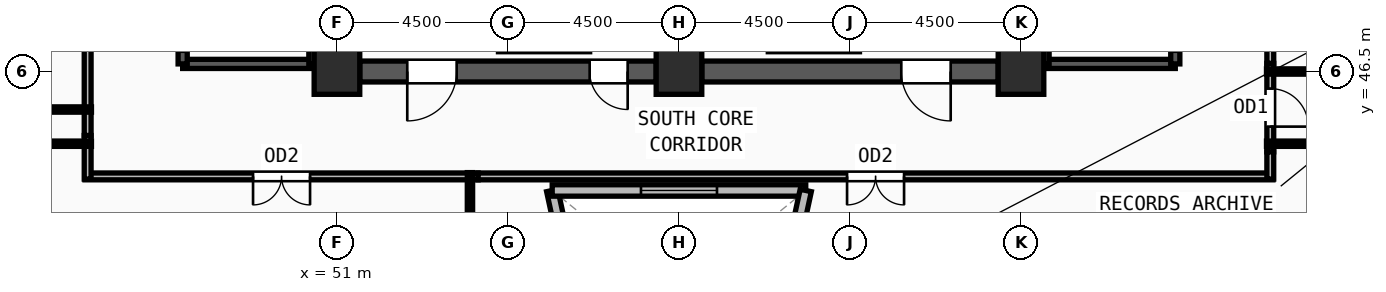
"""IFC4 building model, lengths in metres.
Left out: names, types, materials, properties, quantities, classifications, styles, units other than length and angle.
Written with IfcOpenShell. Run it as: python <this file> out.ifc"""

import sys

from ifc_helpers import new_model, si_unit, direction, frame, frame_2d, origin, origin_2d, place, context, subcontext, project, spatial, rectangle, extrude, source, transform, mapped, element, fill, save


model = new_model("IFC4")
c1 = context("Model", 3, precision=1e-05, world=origin(), true_north=direction((0.0, 1.0)))
c2 = subcontext(c1, "Body", "Model", "MODEL_VIEW")
j1 = project(units=[si_unit("LENGTHUNIT", "METRE"), si_unit("PLANEANGLEUNIT", "RADIAN")], contexts=[c1])
p1 = place(None, origin())
s1 = spatial("IfcSite", under=j1, at=p1, CompositionType="ELEMENT")
p2 = place(p1, origin())
s2 = spatial("IfcBuilding", under=s1, at=p2, CompositionType="ELEMENT")
p3 = place(p2, frame((0.0, 0.0, 339.75)))
s3 = spatial("IfcBuildingStorey", under=s2, at=p3, CompositionType="ELEMENT", Elevation=339.75)
m1 = source(origin(), c2, "Body", "SweptSolid", [
    extrude(rectangle(XDim=1.2, YDim=1.2, at=origin_2d()), origin(), (0.0, 0.0, 1.0), 3.75),
])
for number, where, z_axis, x_axis in (
    (1, (51.0, 46.5, 0.0), (0.0, 0.0, 1.0), (1.0, 0.0, 0.0)),
    (2, (60.0, 46.5, 0.0), (0.0, 0.0, 1.0), (1.0, 0.0, 0.0)),
    (3, (69.0, 46.5, 0.0), (0.0, 0.0, 1.0), (1.0, 0.0, 0.0)),
):
    element("IfcColumn", number, at=place(p3, frame(where, z_axis=z_axis, x_axis=x_axis)), inside=s3, PredefinedType="COLUMN", context=c2, shape_type="MappedRepresentation", body=[
        mapped(m1, transform((0.0, 0.0, 0.0), x_axis=(1.0, 0.0, 0.0), y_axis=(0.0, 1.0, 0.0), z_axis=(0.0, 0.0, 1.0), scale=1.0)),
    ])
p4 = place(p3, frame((40.771, 44.855, 0.0), z_axis=(0.0, 0.0, 1.0), x_axis=(0.558627041585, -0.82941897037, 0.0)))
e4 = element("IfcWall", 4, at=p4, inside=s3, PredefinedType="SOLIDWALL", context=c2, shape_type="SweptSolid", body=[
    extrude(rectangle(XDim=25.455, YDim=0.38, at=frame_2d((12.728, 0.0))), origin(), (0.0, 0.0, 1.0), 3.57),
])
m2 = source(origin(), c2, "Body", "SweptSolid", [
    extrude(rectangle(XDim=1.35, YDim=1.85, at=frame_2d((0.675, 0.925))), frame((0.0, 0.2, 0.0), z_axis=(0.0, -1.0, 0.0), x_axis=(1.0, 0.0, 0.0)), (0.0, 0.0, 1.0), 0.4),
])
p5 = place(p4, frame((5.689, 0.0, 0.55)))
e5 = element("IfcOpeningElement", 5, at=p5, cuts=e4, PredefinedType="OPENING", context=c2, shape_type="MappedRepresentation", body=[
    mapped(m2, transform((0.0, 0.0, 0.0), x_axis=(1.0, 0.0, 0.0), y_axis=(0.0, 1.0, 0.0), z_axis=(0.0, 0.0, 1.0), scale=1.0)),
])
p6 = place(p4, frame((12.053, 0.0, 0.55)))
e6 = element("IfcOpeningElement", 6, at=p6, cuts=e4, PredefinedType="OPENING", context=c2, shape_type="MappedRepresentation", body=[
    mapped(m2, transform((0.0, 0.0, 0.0), x_axis=(1.0, 0.0, 0.0), y_axis=(0.0, 1.0, 0.0), z_axis=(0.0, 0.0, 1.0), scale=1.0)),
])
p7 = place(p4, frame((18.416, 0.0, 0.55)))
e7 = element("IfcOpeningElement", 7, at=p7, cuts=e4, PredefinedType="OPENING", context=c2, shape_type="MappedRepresentation", body=[
    mapped(m2, transform((0.0, 0.0, 0.0), x_axis=(1.0, 0.0, 0.0), y_axis=(0.0, 1.0, 0.0), z_axis=(0.0, 0.0, 1.0), scale=1.0)),
])
p8 = place(p3, frame((68.4, 46.5, 0.0), z_axis=(0.0, 0.0, 1.0), x_axis=(-1.0, 0.0, 0.0)))
e8 = element("IfcWall", 8, at=p8, inside=s3, PredefinedType="SHEAR", context=c2, shape_type="SweptSolid", body=[
    extrude(rectangle(XDim=7.8, YDim=0.55, at=frame_2d((3.9, 0.0))), origin(), (0.0, 0.0, 1.0), 3.57),
])
m3 = source(origin(), c2, "Body", "SweptSolid", [
    extrude(rectangle(XDim=1.3, YDim=2.2, at=frame_2d((0.65, 1.1))), frame((0.0, 0.285, 0.0), z_axis=(0.0, -1.0, 0.0), x_axis=(1.0, 0.0, 0.0)), (0.0, 0.0, 1.0), 0.57),
])
p9 = place(p8, frame((1.25, 0.0, 0.0)))
e9 = element("IfcOpeningElement", 9, at=p9, cuts=e8, PredefinedType="OPENING", context=c2, shape_type="MappedRepresentation", body=[
    mapped(m3, transform((0.0, 0.0, 0.0), x_axis=(1.0, 0.0, 0.0), y_axis=(0.0, 1.0, 0.0), z_axis=(0.0, 0.0, 1.0), scale=1.0)),
])
p10 = place(p3, frame((59.4, 46.5, 0.0), z_axis=(0.0, 0.0, 1.0), x_axis=(-1.0, 0.0, 0.0)))
e10 = element("IfcWall", 10, at=p10, inside=s3, PredefinedType="SHEAR", context=c2, shape_type="SweptSolid", body=[
    extrude(rectangle(XDim=7.8, YDim=0.55, at=frame_2d((3.9, 0.0))), origin(), (0.0, 0.0, 1.0), 3.57),
])
p11 = place(p10, frame((5.25, 0.0, 0.0)))
e11 = element("IfcOpeningElement", 11, at=p11, cuts=e10, PredefinedType="OPENING", context=c2, shape_type="MappedRepresentation", body=[
    mapped(m3, transform((0.0, 0.0, 0.0), x_axis=(1.0, 0.0, 0.0), y_axis=(0.0, 1.0, 0.0), z_axis=(0.0, 0.0, 1.0), scale=1.0)),
])
m4 = source(origin(), c2, "Body", "SweptSolid", [
    extrude(rectangle(XDim=1.0, YDim=2.2, at=frame_2d((0.5, 1.1))), frame((0.0, 0.285, 0.0), z_axis=(0.0, -1.0, 0.0), x_axis=(1.0, 0.0, 0.0)), (0.0, 0.0, 1.0), 0.57),
])
p12 = place(p10, frame((0.75, 0.0, 0.0)))
e12 = element("IfcOpeningElement", 12, at=p12, cuts=e10, PredefinedType="OPENING", context=c2, shape_type="MappedRepresentation", body=[
    mapped(m4, transform((0.0, 0.0, 0.0), x_axis=(1.0, 0.0, 0.0), y_axis=(0.0, 1.0, 0.0), z_axis=(0.0, 0.0, 1.0), scale=1.0)),
])
p13 = place(p3, frame((46.94, 46.7, 0.0), z_axis=(0.0, 0.0, 1.0), x_axis=(1.0, 0.0, 0.0)))
e13 = element("IfcWall", 13, at=p13, inside=s3, PredefinedType="SOLIDWALL", context=c2, shape_type="SweptSolid", body=[
    extrude(rectangle(XDim=3.44, YDim=0.24, at=frame_2d((1.72, 0.0))), origin(), (0.0, 0.0, 1.0), 3.57),
])
p14 = place(p3, frame((50.38, 46.7, 0.0), z_axis=(0.0, 0.0, 1.0), x_axis=(0.0, 1.0, 0.0)))
e14 = element("IfcWall", 14, at=p14, inside=s3, PredefinedType="SOLIDWALL", context=c2, shape_type="SweptSolid", body=[
    extrude(rectangle(XDim=7.82, YDim=0.24, at=frame_2d((3.91, 0.0))), origin(), (0.0, 0.0, 1.0), 3.57),
])
p15 = place(p3, frame((46.94, 54.52, 0.0), z_axis=(0.0, 0.0, 1.0), x_axis=(0.0, -1.0, 0.0)))
e15 = element("IfcWall", 15, at=p15, inside=s3, PredefinedType="SOLIDWALL", context=c2, shape_type="SweptSolid", body=[
    extrude(rectangle(XDim=7.82, YDim=0.24, at=frame_2d((3.91, 0.0))), origin(), (0.0, 0.0, 1.0), 3.57),
])
m5 = source(origin(), c2, "Body", "SweptSolid", [
    extrude(rectangle(XDim=1.2, YDim=2.2, at=frame_2d((0.6, 1.1))), frame((0.0, 0.13, 0.0), z_axis=(0.0, -1.0, 0.0), x_axis=(1.0, 0.0, 0.0)), (0.0, 0.0, 1.0), 0.26),
])
p16 = place(p15, frame((6.3, 0.0, 0.0)))
e16 = element("IfcOpeningElement", 16, at=p16, cuts=e15, PredefinedType="OPENING", context=c2, shape_type="MappedRepresentation", body=[
    mapped(m5, transform((0.0, 0.0, 0.0), x_axis=(1.0, 0.0, 0.0), y_axis=(0.0, 1.0, 0.0), z_axis=(0.0, 0.0, 1.0), scale=1.0)),
])
p17 = place(p3, frame((69.62, 46.7, 0.0), z_axis=(0.0, 0.0, 1.0), x_axis=(1.0, 0.0, 0.0)))
e17 = element("IfcWall", 17, at=p17, inside=s3, PredefinedType="SOLIDWALL", context=c2, shape_type="SweptSolid", body=[
    extrude(rectangle(XDim=3.44, YDim=0.24, at=frame_2d((1.72, 0.0))), origin(), (0.0, 0.0, 1.0), 3.57),
])
p18 = place(p3, frame((73.06, 46.7, 0.0), z_axis=(0.0, 0.0, 1.0), x_axis=(0.0, 1.0, 0.0)))
e18 = element("IfcWall", 18, at=p18, inside=s3, PredefinedType="SOLIDWALL", context=c2, shape_type="SweptSolid", body=[
    extrude(rectangle(XDim=7.82, YDim=0.24, at=frame_2d((3.91, 0.0))), origin(), (0.0, 0.0, 1.0), 3.57),
])
p19 = place(p18, frame((0.32, 0.0, 0.0)))
e19 = element("IfcOpeningElement", 19, at=p19, cuts=e18, PredefinedType="OPENING", context=c2, shape_type="MappedRepresentation", body=[
    mapped(m5, transform((0.0, 0.0, 0.0), x_axis=(1.0, 0.0, 0.0), y_axis=(0.0, 1.0, 0.0), z_axis=(0.0, 0.0, 1.0), scale=1.0)),
])
p20 = place(p3, frame((69.62, 54.52, 0.0), z_axis=(0.0, 0.0, 1.0), x_axis=(0.0, -1.0, 0.0)))
e20 = element("IfcWall", 20, at=p20, inside=s3, PredefinedType="SOLIDWALL", context=c2, shape_type="SweptSolid", body=[
    extrude(rectangle(XDim=7.82, YDim=0.24, at=frame_2d((3.91, 0.0))), origin(), (0.0, 0.0, 1.0), 3.57),
])
p21 = place(p3, frame((57.832, 37.971, 0.0), z_axis=(0.0, 0.0, 1.0), x_axis=(-0.211433211418, 0.977392447848, 0.0)))
e21 = element("IfcWall", 21, at=p21, inside=s3, PredefinedType="SOLIDWALL", context=c2, shape_type="SweptSolid", body=[
    extrude(rectangle(XDim=5.524, YDim=0.3, at=frame_2d((2.762, 0.0))), origin(), (0.0, 0.0, 1.0), 3.57),
])
m6 = source(origin(), c2, "Body", "SweptSolid", [
    extrude(rectangle(XDim=2.0, YDim=1.9, at=frame_2d((1.0, 0.95))), frame((0.0, 0.16, 0.0), z_axis=(0.0, -1.0, 0.0), x_axis=(1.0, 0.0, 0.0)), (0.0, 0.0, 1.0), 0.32),
])
p22 = place(p21, frame((1.762, 0.0, 0.55)))
e22 = element("IfcOpeningElement", 22, at=p22, cuts=e21, PredefinedType="OPENING", context=c2, shape_type="MappedRepresentation", body=[
    mapped(m6, transform((0.0, 0.0, 0.0), x_axis=(1.0, 0.0, 0.0), y_axis=(0.0, 1.0, 0.0), z_axis=(0.0, 0.0, 1.0), scale=1.0)),
])
p23 = place(p3, frame((56.664, 43.37, 0.0), z_axis=(0.0, 0.0, 1.0), x_axis=(1.0, 0.0, 0.0)))
e23 = element("IfcWall", 23, at=p23, inside=s3, PredefinedType="SOLIDWALL", context=c2, shape_type="SweptSolid", body=[
    extrude(rectangle(XDim=6.672, YDim=0.3, at=frame_2d((3.336, 0.0))), origin(), (0.0, 0.0, 1.0), 3.57),
])
p24 = place(p23, frame((2.336, 0.0, 0.55)))
e24 = element("IfcOpeningElement", 24, at=p24, cuts=e23, PredefinedType="OPENING", context=c2, shape_type="MappedRepresentation", body=[
    mapped(m6, transform((0.0, 0.0, 0.0), x_axis=(1.0, 0.0, 0.0), y_axis=(0.0, 1.0, 0.0), z_axis=(0.0, 0.0, 1.0), scale=1.0)),
])
p25 = place(p3, frame((63.336, 43.37, 0.0), z_axis=(0.0, 0.0, 1.0), x_axis=(-0.211433211418, -0.977392447848, 0.0)))
e25 = element("IfcWall", 25, at=p25, inside=s3, PredefinedType="SOLIDWALL", context=c2, shape_type="SweptSolid", body=[
    extrude(rectangle(XDim=5.524, YDim=0.3, at=frame_2d((2.762, 0.0))), origin(), (0.0, 0.0, 1.0), 3.57),
])
p26 = place(p25, frame((1.762, 0.0, 0.55)))
e26 = element("IfcOpeningElement", 26, at=p26, cuts=e25, PredefinedType="OPENING", context=c2, shape_type="MappedRepresentation", body=[
    mapped(m6, transform((0.0, 0.0, 0.0), x_axis=(1.0, 0.0, 0.0), y_axis=(0.0, 1.0, 0.0), z_axis=(0.0, 0.0, 1.0), scale=1.0)),
])
p27 = place(p3, frame((44.44, 44.815, 0.0), z_axis=(0.0, 0.0, 1.0), x_axis=(0.0, 1.0, 0.0)))
e27 = element("IfcWall", 27, at=p27, inside=s3, PredefinedType="PARTITIONING", context=c2, shape_type="SweptSolid", body=[
    extrude(rectangle(XDim=9.47, YDim=0.18, at=frame_2d((4.735, 0.0))), origin(), (0.0, 0.0, 1.0), 3.57),
])
m7 = source(origin(), c2, "Body", "SweptSolid", [
    extrude(rectangle(XDim=1.0, YDim=2.2, at=frame_2d((0.5, 1.1))), frame((0.0, 0.1, 0.0), z_axis=(0.0, -1.0, 0.0), x_axis=(1.0, 0.0, 0.0)), (0.0, 0.0, 1.0), 0.2),
])
p28 = place(p27, frame((4.47, 0.0, 0.0)))
e28 = element("IfcOpeningElement", 28, at=p28, cuts=e27, PredefinedType="OPENING", context=c2, shape_type="MappedRepresentation", body=[
    mapped(m7, transform((0.0, 0.0, 0.0), x_axis=(1.0, 0.0, 0.0), y_axis=(0.0, 1.0, 0.0), z_axis=(0.0, 0.0, 1.0), scale=1.0)),
])
p29 = place(p3, frame((54.715, 43.74, 0.0), z_axis=(0.0, 0.0, 1.0), x_axis=(-1.0, 0.0, 0.0)))
e29 = element("IfcWall", 29, at=p29, inside=s3, PredefinedType="PARTITIONING", context=c2, shape_type="SweptSolid", body=[
    extrude(rectangle(XDim=10.345, YDim=0.18, at=frame_2d((5.172, 0.0))), origin(), (0.0, 0.0, 1.0), 3.57),
])
m8 = source(origin(), c2, "Body", "SweptSolid", [
    extrude(rectangle(XDim=1.5, YDim=2.2, at=frame_2d((0.75, 1.1))), frame((0.0, 0.1, 0.0), z_axis=(0.0, -1.0, 0.0), x_axis=(1.0, 0.0, 0.0)), (0.0, 0.0, 1.0), 0.2),
])
p30 = place(p29, frame((4.423, 0.0, 0.0)))
e30 = element("IfcOpeningElement", 30, at=p30, cuts=e29, PredefinedType="OPENING", context=c2, shape_type="MappedRepresentation", body=[
    mapped(m8, transform((0.0, 0.0, 0.0), x_axis=(1.0, 0.0, 0.0), y_axis=(0.0, 1.0, 0.0), z_axis=(0.0, 0.0, 1.0), scale=1.0)),
])
p31 = place(p3, frame((75.63, 43.74, 0.0), z_axis=(0.0, 0.0, 1.0), x_axis=(-1.0, 0.0, 0.0)))
e31 = element("IfcWall", 31, at=p31, inside=s3, PredefinedType="PARTITIONING", context=c2, shape_type="SweptSolid", body=[
    extrude(rectangle(XDim=20.915, YDim=0.18, at=frame_2d((10.458, 0.0))), origin(), (0.0, 0.0, 1.0), 3.57),
])
p32 = place(p31, frame((9.707, 0.0, 0.0)))
e32 = element("IfcOpeningElement", 32, at=p32, cuts=e31, PredefinedType="OPENING", context=c2, shape_type="MappedRepresentation", body=[
    mapped(m8, transform((0.0, 0.0, 0.0), x_axis=(1.0, 0.0, 0.0), y_axis=(0.0, 1.0, 0.0), z_axis=(0.0, 0.0, 1.0), scale=1.0)),
])
p33 = place(p3, frame((75.56, 46.715, 0.0), z_axis=(0.0, 0.0, 1.0), x_axis=(0.0, -1.0, 0.0)))
e33 = element("IfcWall", 33, at=p33, inside=s3, PredefinedType="PARTITIONING", context=c2, shape_type="SweptSolid", body=[
    extrude(rectangle(XDim=2.33, YDim=0.18, at=frame_2d((1.165, 0.0))), origin(), (0.0, 0.0, 1.0), 3.57),
])
p34 = place(p33, frame((0.665, 0.0, 0.0)))
e34 = element("IfcOpeningElement", 34, at=p34, cuts=e33, PredefinedType="OPENING", context=c2, shape_type="MappedRepresentation", body=[
    mapped(m7, transform((0.0, 0.0, 0.0), x_axis=(1.0, 0.0, 0.0), y_axis=(0.0, 1.0, 0.0), z_axis=(0.0, 0.0, 1.0), scale=1.0)),
])
p35 = place(p3, frame((44.44, 43.67, 0.0), z_axis=(0.0, 0.0, 1.0), x_axis=(0.0, 1.0, 0.0)))
e35 = element("IfcWall", 35, at=p35, inside=s3, PredefinedType="PARTITIONING", context=c2, shape_type="SweptSolid", body=[
    extrude(rectangle(XDim=1.145, YDim=0.18, at=frame_2d((0.573, 0.0))), origin(), (0.0, 0.0, 1.0), 3.57),
])
p36 = place(p3, frame((75.56, 44.385, 0.0), z_axis=(0.0, 0.0, 1.0), x_axis=(0.0, -1.0, 0.0)))
e36 = element("IfcWall", 36, at=p36, inside=s3, PredefinedType="PARTITIONING", context=c2, shape_type="SweptSolid", body=[
    extrude(rectangle(XDim=0.715, YDim=0.18, at=frame_2d((0.357, 0.0))), origin(), (0.0, 0.0, 1.0), 3.57),
])
p37 = place(p3, frame((75.56, 48.21, 0.0), z_axis=(0.0, 0.0, 1.0), x_axis=(0.0, -1.0, 0.0)))
e37 = element("IfcWall", 37, at=p37, inside=s3, PredefinedType="PARTITIONING", context=c2, shape_type="SweptSolid", body=[
    extrude(rectangle(XDim=1.495, YDim=0.18, at=frame_2d((0.748, 0.0))), origin(), (0.0, 0.0, 1.0), 3.57),
])
p38 = place(p3, frame((44.54, 44.6, 0.0), z_axis=(0.0, 0.0, 1.0), x_axis=(-1.0, 0.0, 0.0)))
e38 = element("IfcWall", 38, at=p38, inside=s3, PredefinedType="PARTITIONING", context=c2, shape_type="SweptSolid", body=[
    extrude(rectangle(XDim=4.357, YDim=0.14, at=frame_2d((2.178, 0.0))), origin(), (0.0, 0.0, 1.0), 3.57),
])
p39 = place(p3, frame((44.54, 45.5, 0.0), z_axis=(0.0, 0.0, 1.0), x_axis=(-1.0, 0.0, 0.0)))
e39 = element("IfcWall", 39, at=p39, inside=s3, PredefinedType="PARTITIONING", context=c2, shape_type="SweptSolid", body=[
    extrude(rectangle(XDim=4.86, YDim=0.14, at=frame_2d((2.43, 0.0))), origin(), (0.0, 0.0, 1.0), 3.57),
])
p40 = place(p3, frame((75.46, 44.6, 0.0), z_axis=(0.0, 0.0, 1.0), x_axis=(1.0, 0.0, 0.0)))
e40 = element("IfcWall", 40, at=p40, inside=s3, PredefinedType="PARTITIONING", context=c2, shape_type="SweptSolid", body=[
    extrude(rectangle(XDim=4.085, YDim=0.14, at=frame_2d((2.042, 0.0))), origin(), (0.0, 0.0, 1.0), 3.57),
])
p41 = place(p3, frame((75.46, 46.5, 0.0), z_axis=(0.0, 0.0, 1.0), x_axis=(1.0, 0.0, 0.0)))
e41 = element("IfcWall", 41, at=p41, inside=s3, PredefinedType="PARTITIONING", context=c2, shape_type="SweptSolid", body=[
    extrude(rectangle(XDim=5.013, YDim=0.14, at=frame_2d((2.506, 0.0))), origin(), (0.0, 0.0, 1.0), 3.57),
])
p42 = place(p3, frame((54.5, 43.84, 0.0), z_axis=(0.0, 0.0, 1.0), x_axis=(0.0, -1.0, 0.0)))
e42 = element("IfcWall", 42, at=p42, inside=s3, PredefinedType="PARTITIONING", context=c2, shape_type="SweptSolid", body=[
    extrude(rectangle(XDim=20.497, YDim=0.14, at=frame_2d((10.249, 0.0))), origin(), (0.0, 0.0, 1.0), 2.967),
])
m9 = source(origin(), c2, "Body", "SweptSolid", [
    extrude(rectangle(XDim=1.3, YDim=2.2, at=frame_2d((0.65, 1.1))), frame((0.0, 0.025, 0.0), z_axis=(0.0, -1.0, 0.0), x_axis=(1.0, 0.0, 0.0)), (0.0, 0.0, 1.0), 0.05),
])
p43 = place(p11, origin())
e43 = element("IfcDoor", 43, at=p43, inside=s3, OperationType="SINGLE_SWING_RIGHT", PredefinedType="DOOR", context=c2, shape_type="MappedRepresentation", body=[
    mapped(m9, transform((0.0, 0.0, 0.0), x_axis=(1.0, 0.0, 0.0), y_axis=(0.0, 1.0, 0.0), z_axis=(0.0, 0.0, 1.0), scale=1.0)),
])
fill(e11, e43)
m10 = source(origin(), c2, "Body", "SweptSolid", [
    extrude(rectangle(XDim=1.0, YDim=2.2, at=frame_2d((0.5, 1.1))), frame((0.0, 0.025, 0.0), z_axis=(0.0, -1.0, 0.0), x_axis=(1.0, 0.0, 0.0)), (0.0, 0.0, 1.0), 0.05),
])
p44 = place(p12, origin())
e44 = element("IfcDoor", 44, at=p44, inside=s3, OperationType="SINGLE_SWING_LEFT", PredefinedType="DOOR", context=c2, shape_type="MappedRepresentation", body=[
    mapped(m10, transform((0.0, 0.0, 0.0), x_axis=(1.0, 0.0, 0.0), y_axis=(0.0, 1.0, 0.0), z_axis=(0.0, 0.0, 1.0), scale=1.0)),
])
fill(e12, e44)
p45 = place(p9, origin())
e45 = element("IfcDoor", 45, at=p45, inside=s3, OperationType="SINGLE_SWING_LEFT", PredefinedType="DOOR", context=c2, shape_type="MappedRepresentation", body=[
    mapped(m9, transform((0.0, 0.0, 0.0), x_axis=(1.0, 0.0, 0.0), y_axis=(0.0, 1.0, 0.0), z_axis=(0.0, 0.0, 1.0), scale=1.0)),
])
fill(e9, e45)
m11 = source(origin(), c2, "Body", "SweptSolid", [
    extrude(rectangle(XDim=2.0, YDim=1.9, at=frame_2d((1.0, 0.95))), frame((0.0, 0.03, 0.0), z_axis=(0.0, -1.0, 0.0), x_axis=(1.0, 0.0, 0.0)), (0.0, 0.0, 1.0), 0.06),
])
p46 = place(p24, origin())
e46 = element("IfcWindow", 46, at=p46, inside=s3, PartitioningType="DOUBLE_PANEL_VERTICAL", PredefinedType="WINDOW", context=c2, shape_type="MappedRepresentation", body=[
    mapped(m11, transform((0.0, 0.0, 0.0), x_axis=(1.0, 0.0, 0.0), y_axis=(0.0, 1.0, 0.0), z_axis=(0.0, 0.0, 1.0), scale=1.0)),
])
fill(e24, e46)
m12 = source(origin(), c2, "Body", "SweptSolid", [
    extrude(rectangle(XDim=1.5, YDim=2.2, at=frame_2d((0.75, 1.1))), frame((0.0, 0.025, 0.0), z_axis=(0.0, -1.0, 0.0), x_axis=(1.0, 0.0, 0.0)), (0.0, 0.0, 1.0), 0.05),
])
p47 = place(p30, origin())
e47 = element("IfcDoor", 47, at=p47, inside=s3, OperationType="DOUBLE_DOOR_SINGLE_SWING", PredefinedType="DOOR", context=c2, shape_type="MappedRepresentation", body=[
    mapped(m12, transform((0.0, 0.0, 0.0), x_axis=(1.0, 0.0, 0.0), y_axis=(0.0, 1.0, 0.0), z_axis=(0.0, 0.0, 1.0), scale=1.0)),
])
fill(e30, e47)
p48 = place(p32, origin())
e48 = element("IfcDoor", 48, at=p48, inside=s3, OperationType="DOUBLE_DOOR_SINGLE_SWING", PredefinedType="DOOR", context=c2, shape_type="MappedRepresentation", body=[
    mapped(m12, transform((0.0, 0.0, 0.0), x_axis=(1.0, 0.0, 0.0), y_axis=(0.0, 1.0, 0.0), z_axis=(0.0, 0.0, 1.0), scale=1.0)),
])
fill(e32, e48)
p49 = place(p34, origin())
e49 = element("IfcDoor", 49, at=p49, inside=s3, OperationType="SINGLE_SWING_RIGHT", PredefinedType="DOOR", context=c2, shape_type="MappedRepresentation", body=[
    mapped(m10, transform((0.0, 0.0, 0.0), x_axis=(1.0, 0.0, 0.0), y_axis=(0.0, 1.0, 0.0), z_axis=(0.0, 0.0, 1.0), scale=1.0)),
])
fill(e34, e49)
save(model, sys.argv[1])
